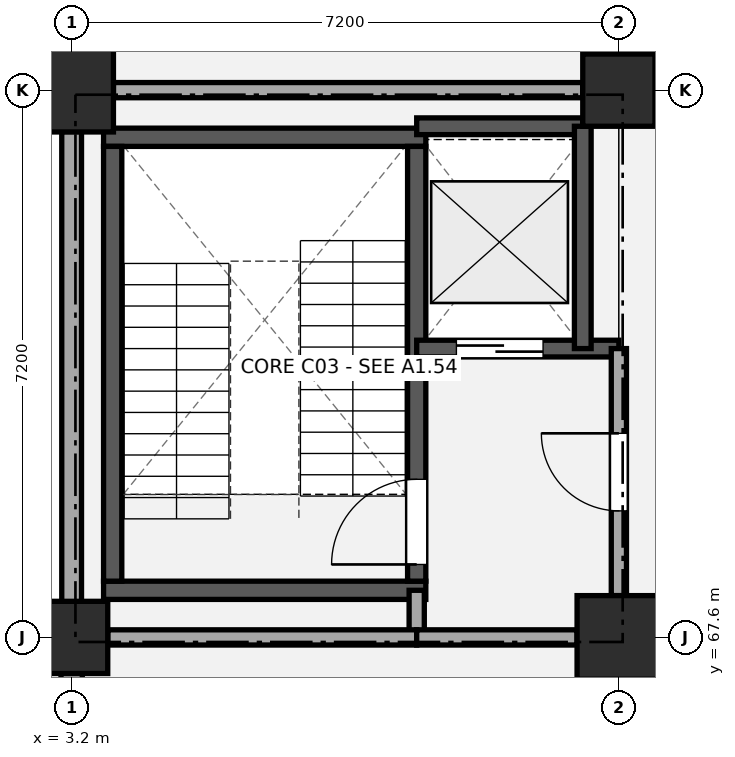
"""IFC4 building model, lengths in metres.
Left out: names, types, materials, properties, quantities, classifications, styles, units other than length and angle.
Written with IfcOpenShell. Run it as: python <this file> out.ifc"""

import sys

from ifc_helpers import new_model, si_unit, direction, frame, frame_2d, origin, origin_2d, place, context, subcontext, project, spatial, rectangle, extrude, element, fill, save


model = new_model("IFC4")
c1 = context("Model", 3, precision=1e-05, world=origin(), true_north=direction((0.0, 1.0)))
c2 = subcontext(c1, "Body", "Model", "MODEL_VIEW")
j1 = project(units=[si_unit("LENGTHUNIT", "METRE"), si_unit("PLANEANGLEUNIT", "RADIAN")], contexts=[c1])
p1 = place(None, origin())
s1 = spatial("IfcSite", under=j1, at=p1, CompositionType="ELEMENT")
p2 = place(p1, origin())
s2 = spatial("IfcBuilding", under=s1, at=p2, CompositionType="ELEMENT")
p3 = place(p2, frame((0.0, 0.0, 4.68)))
s3 = spatial("IfcBuildingStorey", under=s2, at=p3, CompositionType="ELEMENT", Elevation=4.68)
p4 = place(p3, frame((3.2, 67.6, 0.0), z_axis=(0.0, 0.0, 1.0), x_axis=(1.0, 0.0, 0.0)))
e1 = element("IfcColumn", 1, at=p4, inside=s3, PredefinedType="COLUMN", context=c2, shape_type="SweptSolid", body=[
    extrude(rectangle(XDim=0.95, YDim=0.95, at=origin_2d()), origin(), (0.0, 0.0, 1.0), 4.5),
])
for number, where, z_axis, x_axis in (
    (2, (3.2, 74.8, 0.0), (0.0, 0.0, 1.0), (1.0, 0.0, 0.0)),
    (3, (10.4, 67.6, 0.0), (0.0, 0.0, 1.0), (1.0, 0.0, 0.0)),
):
    element("IfcColumn", number, at=place(p3, frame(where, z_axis=z_axis, x_axis=x_axis)), inside=s3, PredefinedType="COLUMN", context=c2, shape_type="SweptSolid", body=[
        extrude(rectangle(XDim=1.1, YDim=1.1, at=origin_2d()), origin(), (0.0, 0.0, 1.0), 4.5),
    ])
p5 = place(p3, frame((10.4, 74.8, 0.0), z_axis=(0.0, 0.0, 1.0), x_axis=(1.0, 0.0, 0.0)))
e4 = element("IfcColumn", 4, at=p5, inside=s3, PredefinedType="COLUMN", context=c2, shape_type="SweptSolid", body=[
    extrude(rectangle(XDim=0.95, YDim=0.95, at=origin_2d()), origin(), (0.0, 0.0, 1.0), 4.5),
])
p6 = place(p3, frame((3.2, 60.945, 0.0), z_axis=(0.0, 0.0, 1.0), x_axis=(0.0, 1.0, 0.0)))
e5 = element("IfcWall", 5, at=p6, inside=s3, PredefinedType="STANDARD", context=c2, shape_type="SweptSolid", body=[
    extrude(rectangle(XDim=6.185, YDim=0.28, at=frame_2d((3.092, 0.0))), origin(), (0.0, 0.0, 1.0), 3.49),
])
p7 = place(p6, frame((2.343, 0.0, 0.95)))
e6 = element("IfcOpeningElement", 6, at=p7, cuts=e5, PredefinedType="OPENING", context=c2, shape_type="SweptSolid", body=[
    extrude(rectangle(XDim=1.5, YDim=1.65, at=frame_2d((0.75, 0.825))), frame((0.0, 0.15, 0.0), z_axis=(0.0, -1.0, 0.0), x_axis=(1.0, 0.0, 0.0)), (0.0, 0.0, 1.0), 0.3),
])
p8 = place(p3, frame((3.2, 68.07, 0.0), z_axis=(0.0, 0.0, 1.0), x_axis=(0.0, 1.0, 0.0)))
e7 = element("IfcWall", 7, at=p8, inside=s3, PredefinedType="STANDARD", context=c2, shape_type="SweptSolid", body=[
    extrude(rectangle(XDim=6.185, YDim=0.26, at=frame_2d((3.092, 0.0))), origin(), (0.0, 0.0, 1.0), 3.51),
])
for number, where, z_axis, x_axis in (
    (8, (3.62, 68.22, 0.0), (0.0, 0.0, 1.0), (1.0, 0.0, 0.0)),
    (9, (3.62, 74.18, 0.0), (0.0, 0.0, 1.0), (1.0, 0.0, 0.0)),
):
    element("IfcWall", number, at=place(p3, frame(where, z_axis=z_axis, x_axis=x_axis)), inside=s3, PredefinedType="SHEAR", context=c2, shape_type="SweptSolid", body=[
        extrude(rectangle(XDim=4.24, YDim=0.24, at=frame_2d((2.12, 0.0))), origin(), (0.0, 0.0, 1.0), 4.22),
    ])
p9 = place(p3, frame((3.74, 68.34, 0.0), z_axis=(0.0, 0.0, 1.0), x_axis=(0.0, 1.0, 0.0)))
e10 = element("IfcWall", 10, at=p9, inside=s3, PredefinedType="SHEAR", context=c2, shape_type="SweptSolid", body=[
    extrude(rectangle(XDim=5.72, YDim=0.24, at=frame_2d((2.86, 0.0))), origin(), (0.0, 0.0, 1.0), 4.22),
])
p10 = place(p3, frame((7.74, 68.34, 0.0), z_axis=(0.0, 0.0, 1.0), x_axis=(0.0, 1.0, 0.0)))
e11 = element("IfcWall", 11, at=p10, inside=s3, PredefinedType="SHEAR", context=c2, shape_type="SweptSolid", body=[
    extrude(rectangle(XDim=5.72, YDim=0.24, at=frame_2d((2.86, 0.0))), origin(), (0.0, 0.0, 1.0), 4.22),
])
p11 = place(p10, frame((0.22, 0.0, 0.0)))
e12 = element("IfcOpeningElement", 12, at=p11, cuts=e11, PredefinedType="OPENING", context=c2, shape_type="SweptSolid", body=[
    extrude(rectangle(XDim=1.12, YDim=2.15, at=frame_2d((0.56, 1.075))), frame((0.0, 0.13, 0.0), z_axis=(0.0, -1.0, 0.0), x_axis=(1.0, 0.0, 0.0)), (0.0, 0.0, 1.0), 0.26),
])
p12 = place(p3, frame((7.74, 71.4, 0.0), z_axis=(0.0, 0.0, 1.0), x_axis=(1.0, 0.0, 0.0)))
e13 = element("IfcWall", 13, at=p12, inside=s3, PredefinedType="SHEAR", context=c2, shape_type="SweptSolid", body=[
    extrude(rectangle(XDim=2.66, YDim=0.22, at=frame_2d((1.33, 0.0))), origin(), (0.0, 0.0, 1.0), 4.22),
])
p13 = place(p12, frame((0.522, 0.0, 0.0)))
e14 = element("IfcOpeningElement", 14, at=p13, cuts=e13, PredefinedType="OPENING", context=c2, shape_type="SweptSolid", body=[
    extrude(rectangle(XDim=1.14, YDim=2.15, at=frame_2d((0.57, 1.075))), frame((0.0, 0.12, 0.0), z_axis=(0.0, -1.0, 0.0), x_axis=(1.0, 0.0, 0.0)), (0.0, 0.0, 1.0), 0.24),
])
p14 = place(p3, frame((7.74, 74.325, 0.0), z_axis=(0.0, 0.0, 1.0), x_axis=(1.0, 0.0, 0.0)))
e15 = element("IfcWall", 15, at=p14, inside=s3, PredefinedType="SHEAR", context=c2, shape_type="SweptSolid", body=[
    extrude(rectangle(XDim=2.185, YDim=0.22, at=frame_2d((1.093, 0.0))), origin(), (0.0, 0.0, 1.0), 4.22),
])
p15 = place(p3, frame((9.925, 71.4, 0.0), z_axis=(0.0, 0.0, 1.0), x_axis=(0.0, 1.0, 0.0)))
e16 = element("IfcWall", 16, at=p15, inside=s3, PredefinedType="SHEAR", context=c2, shape_type="SweptSolid", body=[
    extrude(rectangle(XDim=2.925, YDim=0.22, at=frame_2d((1.462, 0.0))), origin(), (0.0, 0.0, 1.0), 4.22),
])
p16 = place(p3, frame((7.74, 67.6, 0.0), z_axis=(0.0, 0.0, 1.0), x_axis=(0.0, 1.0, 0.0)))
e17 = element("IfcWall", 17, at=p16, inside=s3, PredefinedType="PARTITIONING", context=c2, shape_type="SweptSolid", body=[
    extrude(rectangle(XDim=0.62, YDim=0.2, at=frame_2d((0.31, 0.0))), origin(), (0.0, 0.0, 1.0), 3.59),
])
p17 = place(p3, frame((10.4, 68.15, 0.0), z_axis=(0.0, 0.0, 1.0), x_axis=(0.0, 1.0, 0.0)))
e18 = element("IfcWall", 18, at=p17, inside=s3, PredefinedType="PARTITIONING", context=c2, shape_type="SweptSolid", body=[
    extrude(rectangle(XDim=3.25, YDim=0.2, at=frame_2d((1.625, 0.0))), origin(), (0.0, 0.0, 1.0), 3.59),
])
p18 = place(p17, frame((1.115, 0.0, 0.0)))
e19 = element("IfcOpeningElement", 19, at=p18, cuts=e18, PredefinedType="OPENING", context=c2, shape_type="SweptSolid", body=[
    extrude(rectangle(XDim=1.02, YDim=2.15, at=frame_2d((0.51, 1.075))), frame((0.0, 0.11, 0.0), z_axis=(0.0, -1.0, 0.0), x_axis=(1.0, 0.0, 0.0)), (0.0, 0.0, 1.0), 0.22),
])
p19 = place(p3, frame((3.675, 67.6, 0.0), z_axis=(0.0, 0.0, 1.0), x_axis=(1.0, 0.0, 0.0)))
e20 = element("IfcWall", 20, at=p19, inside=s3, PredefinedType="PARTITIONING", context=c2, shape_type="SweptSolid", body=[
    extrude(rectangle(XDim=4.065, YDim=0.2, at=frame_2d((2.032, 0.0))), origin(), (0.0, 0.0, 1.0), 3.59),
])
p20 = place(p3, frame((7.74, 67.6, 0.0), z_axis=(0.0, 0.0, 1.0), x_axis=(1.0, 0.0, 0.0)))
e21 = element("IfcWall", 21, at=p20, inside=s3, PredefinedType="PARTITIONING", context=c2, shape_type="SweptSolid", body=[
    extrude(rectangle(XDim=2.11, YDim=0.2, at=frame_2d((1.055, 0.0))), origin(), (0.0, 0.0, 1.0), 3.59),
])
p21 = place(p3, frame((3.75, 74.8, 0.0), z_axis=(0.0, 0.0, 1.0), x_axis=(1.0, 0.0, 0.0)))
e22 = element("IfcWall", 22, at=p21, inside=s3, PredefinedType="PARTITIONING", context=c2, shape_type="SweptSolid", body=[
    extrude(rectangle(XDim=6.175, YDim=0.2, at=frame_2d((3.087, 0.0))), origin(), (0.0, 0.0, 1.0), 3.54),
])
p22 = place(p3, frame((10.4, 75.275, 0.0), z_axis=(0.0, 0.0, 1.0), x_axis=(0.0, 1.0, 0.0)))
e23 = element("IfcWall", 23, at=p22, inside=s3, PredefinedType="PARTITIONING", context=c2, shape_type="SweptSolid", body=[
    extrude(rectangle(XDim=6.175, YDim=0.16, at=frame_2d((3.087, 0.0))), origin(), (0.0, 0.0, 1.0), 3.54),
])
p23 = place(p22, frame((2.448, 0.0, 0.0)))
e24 = element("IfcOpeningElement", 24, at=p23, cuts=e23, PredefinedType="OPENING", context=c2, shape_type="SweptSolid", body=[
    extrude(rectangle(XDim=1.28, YDim=2.2, at=frame_2d((0.64, 1.1))), frame((0.0, 0.09, 0.0), z_axis=(0.0, -1.0, 0.0), x_axis=(1.0, 0.0, 0.0)), (0.0, 0.0, 1.0), 0.18),
])
p24 = place(p11, origin())
e25 = element("IfcDoor", 25, at=p24, inside=s3, OperationType="SINGLE_SWING_LEFT", PredefinedType="DOOR", context=c2, shape_type="SweptSolid", body=[
    extrude(rectangle(XDim=1.12, YDim=2.15, at=frame_2d((0.56, 1.075))), frame((0.0, 0.025, 0.0), z_axis=(0.0, -1.0, 0.0), x_axis=(1.0, 0.0, 0.0)), (0.0, 0.0, 1.0), 0.05),
])
fill(e12, e25)
p25 = place(p13, origin())
e26 = element("IfcDoor", 26, at=p25, inside=s3, OperationType="SLIDING_TO_LEFT", PredefinedType="DOOR", context=c2, shape_type="SweptSolid", body=[
    extrude(rectangle(XDim=1.14, YDim=2.15, at=frame_2d((0.57, 1.075))), frame((0.0, 0.025, 0.0), z_axis=(0.0, -1.0, 0.0), x_axis=(1.0, 0.0, 0.0)), (0.0, 0.0, 1.0), 0.05),
])
fill(e14, e26)
p26 = place(p18, origin())
e27 = element("IfcDoor", 27, at=p26, inside=s3, OperationType="SINGLE_SWING_RIGHT", PredefinedType="DOOR", context=c2, shape_type="SweptSolid", body=[
    extrude(rectangle(XDim=1.02, YDim=2.15, at=frame_2d((0.51, 1.075))), frame((0.0, 0.025, 0.0), z_axis=(0.0, -1.0, 0.0), x_axis=(1.0, 0.0, 0.0)), (0.0, 0.0, 1.0), 0.05),
])
fill(e19, e27)
save(model, sys.argv[1])
